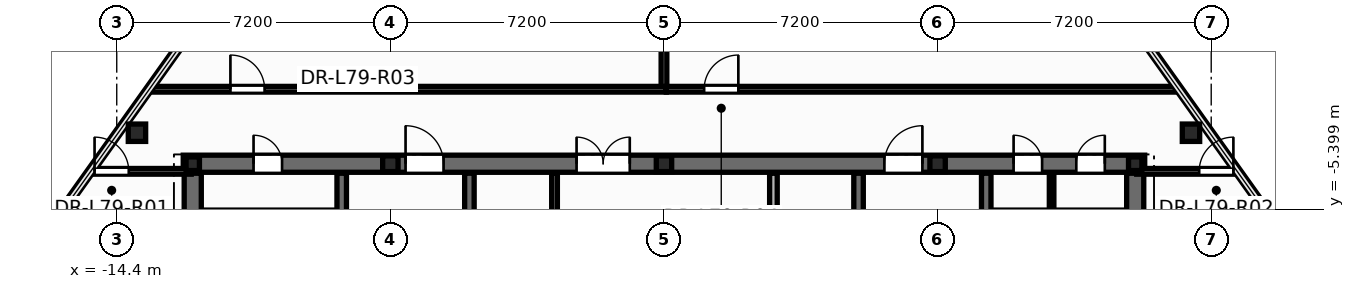
"""IFC4 building model, lengths in metres.
Left out: names, types, materials, properties, quantities, classifications, styles, units other than length and angle.
Written with IfcOpenShell. Run it as: python <this file> out.ifc"""

import sys

from ifc_helpers import new_model, si_unit, direction, frame, frame_2d, origin, origin_2d, place, context, subcontext, project, spatial, rectangle, hollow_circle, i_section, extrude, element, fill, save


model = new_model("IFC4")
c1 = context("Model", 3, precision=1e-05, world=origin(), true_north=direction((0.0, 1.0)))
c2 = subcontext(c1, "Body", "Model", "MODEL_VIEW")
j1 = project(units=[si_unit("LENGTHUNIT", "METRE"), si_unit("PLANEANGLEUNIT", "RADIAN")], contexts=[c1])
p1 = place(None, origin())
s1 = spatial("IfcSite", under=j1, at=p1, CompositionType="ELEMENT")
p2 = place(p1, origin())
s2 = spatial("IfcBuilding", under=s1, at=p2, CompositionType="ELEMENT")
p3 = place(p2, frame((0.0, 0.0, 301.8)))
s3 = spatial("IfcBuildingStorey", under=s2, at=p3, CompositionType="ELEMENT", Elevation=301.8)
for number, where, z_axis, x_axis in (
    (1, (13.868, -3.385, 0.0), (0.0, 0.0, 1.0), (1.0, 0.0, 0.0)),
    (2, (-13.868, -3.385, 0.0), (0.0, 0.0, 1.0), (1.0, 0.0, 0.0)),
):
    element("IfcColumn", number, at=place(p3, frame(where, z_axis=z_axis, x_axis=x_axis)), inside=s3, PredefinedType="COLUMN", context=c2, shape_type="SweptSolid", body=[
        extrude(hollow_circle(Radius=0.229, WallThickness=0.016, at=origin_2d()), origin(), (0.0, 0.0, 1.0), 4.2),
    ])
for number, where, z_axis, x_axis in (
    (3, (12.4, -4.2, 0.0), (0.0, 0.0, 1.0), (1.0, 0.0, 0.0)),
    (4, (-12.4, -4.2, 0.0), (0.0, 0.0, 1.0), (1.0, 0.0, 0.0)),
):
    element("IfcColumn", number, at=place(p3, frame(where, z_axis=z_axis, x_axis=x_axis)), inside=s3, PredefinedType="COLUMN", context=c2, shape_type="SweptSolid", body=[
        extrude(i_section(OverallWidth=0.352, OverallDepth=0.359, WebThickness=0.018, FlangeThickness=0.026, at=origin_2d()), origin(), (0.0, 0.0, 1.0), 4.2),
    ])
for number, where, z_axis, x_axis in (
    (5, (-7.2, -4.2, 0.0), (0.0, 0.0, 1.0), (1.0, 0.0, 0.0)),
    (6, (0.0, -4.2, 0.0), (0.0, 0.0, 1.0), (1.0, 0.0, 0.0)),
    (7, (7.2, -4.2, 0.0), (0.0, 0.0, 1.0), (1.0, 0.0, 0.0)),
):
    element("IfcColumn", number, at=place(p3, frame(where, z_axis=z_axis, x_axis=x_axis)), inside=s3, PredefinedType="PILASTER", context=c2, shape_type="SweptSolid", body=[
        extrude(i_section(OverallWidth=0.405, OverallDepth=0.414, WebThickness=0.022, FlangeThickness=0.032, at=origin_2d()), origin(), (0.0, 0.0, 1.0), 4.2),
    ])
p4 = place(p3, frame((-2.88, -5.6, 0.0), z_axis=(0.0, 0.0, 1.0), x_axis=(0.0, 1.0, 0.0)))
e8 = element("IfcWall", 8, at=p4, inside=s3, PredefinedType="PARTITIONING", context=c2, shape_type="SweptSolid", body=[
    extrude(rectangle(XDim=1.15, YDim=0.15, at=frame_2d((0.575, 0.0))), origin(), (0.0, 0.0, 1.0), 3.88),
])
p5 = place(p3, frame((10.2, -5.52, 0.0), z_axis=(0.0, 0.0, 1.0), x_axis=(0.0, 1.0, 0.0)))
e9 = element("IfcWall", 9, at=p5, inside=s3, PredefinedType="PARTITIONING", context=c2, shape_type="SweptSolid", body=[
    extrude(rectangle(XDim=1.12, YDim=0.12, at=frame_2d((0.56, 0.0))), origin(), (0.0, 0.0, 1.0), 3.88),
])
p6 = place(p3, frame((-12.65, -4.2, 0.0), z_axis=(0.0, 0.0, 1.0), x_axis=(1.0, 0.0, 0.0)))
e10 = element("IfcWall", 10, at=p6, inside=s3, PredefinedType="SHEAR", context=c2, shape_type="SweptSolid", body=[
    extrude(rectangle(XDim=25.3, YDim=0.45, at=frame_2d((12.65, 0.0))), origin(), (0.0, 0.0, 1.0), 4.2),
])
p7 = place(p6, frame((1.85, 0.0, 0.0)))
e11 = element("IfcOpeningElement", 11, at=p7, cuts=e10, PredefinedType="OPENING", context=c2, shape_type="SweptSolid", body=[
    extrude(rectangle(XDim=0.756, YDim=2.054, at=frame_2d((0.375, 1.027))), frame((0.0, 0.235, 0.0), z_axis=(0.0, -1.0, 0.0), x_axis=(1.0, 0.0, 0.0)), (0.0, 0.0, 1.0), 0.47),
])
p8 = place(p6, frame((21.85, 0.0, 0.0)))
e12 = element("IfcOpeningElement", 12, at=p8, cuts=e10, PredefinedType="OPENING", context=c2, shape_type="SweptSolid", body=[
    extrude(rectangle(XDim=0.756, YDim=2.054, at=frame_2d((0.375, 1.027))), frame((0.0, 0.235, 0.0), z_axis=(0.0, -1.0, 0.0), x_axis=(1.0, 0.0, 0.0)), (0.0, 0.0, 1.0), 0.47),
])
p9 = place(p6, frame((23.5, 0.0, 0.0)))
e13 = element("IfcOpeningElement", 13, at=p9, cuts=e10, PredefinedType="OPENING", context=c2, shape_type="SweptSolid", body=[
    extrude(rectangle(XDim=0.756, YDim=2.054, at=frame_2d((0.375, 1.027))), frame((0.0, 0.235, 0.0), z_axis=(0.0, -1.0, 0.0), x_axis=(1.0, 0.0, 0.0)), (0.0, 0.0, 1.0), 0.47),
])
p10 = place(p6, frame((5.85, 0.0, 0.0)))
e14 = element("IfcOpeningElement", 14, at=p10, cuts=e10, PredefinedType="OPENING", context=c2, shape_type="SweptSolid", body=[
    extrude(rectangle(XDim=1.006, YDim=2.104, at=frame_2d((0.5, 1.052))), frame((0.0, 0.235, 0.0), z_axis=(0.0, -1.0, 0.0), x_axis=(1.0, 0.0, 0.0)), (0.0, 0.0, 1.0), 0.47),
])
p11 = place(p6, frame((10.35, 0.0, 0.0)))
e15 = element("IfcOpeningElement", 15, at=p11, cuts=e10, PredefinedType="OPENING", context=c2, shape_type="SweptSolid", body=[
    extrude(rectangle(XDim=1.406, YDim=2.154, at=frame_2d((0.7, 1.077))), frame((0.0, 0.235, 0.0), z_axis=(0.0, -1.0, 0.0), x_axis=(1.0, 0.0, 0.0)), (0.0, 0.0, 1.0), 0.47),
])
p12 = place(p6, frame((18.45, 0.0, 0.0)))
e16 = element("IfcOpeningElement", 16, at=p12, cuts=e10, PredefinedType="OPENING", context=c2, shape_type="SweptSolid", body=[
    extrude(rectangle(XDim=1.006, YDim=2.104, at=frame_2d((0.5, 1.052))), frame((0.0, 0.235, 0.0), z_axis=(0.0, -1.0, 0.0), x_axis=(1.0, 0.0, 0.0)), (0.0, 0.0, 1.0), 0.47),
])
p13 = place(p3, frame((-8.48, -13.85, 0.0), z_axis=(0.0, 0.0, 1.0), x_axis=(0.0, 1.0, 0.0)))
e17 = element("IfcWall", 17, at=p13, inside=s3, PredefinedType="SHEAR", context=c2, shape_type="SweptSolid", body=[
    extrude(rectangle(XDim=9.4, YDim=0.25, at=frame_2d((4.7, 0.0))), origin(), (0.0, 0.0, 1.0), 4.2),
])
p14 = place(p13, frame((6.95, 0.0, 0.0)))
e18 = element("IfcOpeningElement", 18, at=p14, cuts=e17, PredefinedType="OPENING", context=c2, shape_type="SweptSolid", body=[
    extrude(rectangle(XDim=1.006, YDim=2.104, at=frame_2d((0.5, 1.052))), frame((0.0, 0.135, 0.0), z_axis=(0.0, -1.0, 0.0), x_axis=(1.0, 0.0, 0.0)), (0.0, 0.0, 1.0), 0.27),
])
p15 = place(p3, frame((8.48, -13.85, 0.0), z_axis=(0.0, 0.0, 1.0), x_axis=(0.0, 1.0, 0.0)))
e19 = element("IfcWall", 19, at=p15, inside=s3, PredefinedType="SHEAR", context=c2, shape_type="SweptSolid", body=[
    extrude(rectangle(XDim=9.4, YDim=0.25, at=frame_2d((4.7, 0.0))), origin(), (0.0, 0.0, 1.0), 4.2),
])
p16 = place(p15, frame((6.95, 0.0, 0.0)))
e20 = element("IfcOpeningElement", 20, at=p16, cuts=e19, PredefinedType="OPENING", context=c2, shape_type="SweptSolid", body=[
    extrude(rectangle(XDim=1.006, YDim=2.104, at=frame_2d((0.5, 1.052))), frame((0.0, 0.135, 0.0), z_axis=(0.0, -1.0, 0.0), x_axis=(1.0, 0.0, 0.0)), (0.0, 0.0, 1.0), 0.27),
])
for number, where, z_axis, x_axis in (
    (21, (-5.12, -13.85, 0.0), (0.0, 0.0, 1.0), (0.0, 1.0, 0.0)),
    (22, (5.12, -13.85, 0.0), (0.0, 0.0, 1.0), (0.0, 1.0, 0.0)),
):
    element("IfcWall", number, at=place(p3, frame(where, z_axis=z_axis, x_axis=x_axis)), inside=s3, PredefinedType="SHEAR", context=c2, shape_type="SweptSolid", body=[
        extrude(rectangle(XDim=9.4, YDim=0.25, at=frame_2d((4.7, 0.0))), origin(), (0.0, 0.0, 1.0), 4.2),
    ])
for number, where, z_axis, x_axis in (
    (23, (-12.4, -13.85, 0.0), (0.0, 0.0, 1.0), (0.0, 1.0, 0.0)),
    (24, (12.4, -13.85, 0.0), (0.0, 0.0, 1.0), (0.0, 1.0, 0.0)),
):
    element("IfcWall", number, at=place(p3, frame(where, z_axis=z_axis, x_axis=x_axis)), inside=s3, PredefinedType="SHEAR", context=c2, shape_type="SweptSolid", body=[
        extrude(rectangle(XDim=9.4, YDim=0.45, at=frame_2d((4.7, 0.0))), origin(), (0.0, 0.0, 1.0), 4.2),
    ])
p17 = place(p3, frame((2.88, -9.45, 0.0), z_axis=(0.0, 0.0, 1.0), x_axis=(0.0, 1.0, 0.0)))
e25 = element("IfcWall", 25, at=p17, inside=s3, PredefinedType="SOLIDWALL", context=c2, shape_type="SweptSolid", body=[
    extrude(rectangle(XDim=5.0, YDim=0.2, at=frame_2d((2.5, 0.0))), origin(), (0.0, 0.0, 1.0), 3.88),
])
p18 = place(p17, frame((2.05, 0.0, 0.0)))
e26 = element("IfcOpeningElement", 26, at=p18, cuts=e25, PredefinedType="OPENING", context=c2, shape_type="SweptSolid", body=[
    extrude(rectangle(XDim=0.926, YDim=2.104, at=frame_2d((0.46, 1.052))), frame((0.0, 0.11, 0.0), z_axis=(0.0, -1.0, 0.0), x_axis=(1.0, 0.0, 0.0)), (0.0, 0.0, 1.0), 0.22),
])
p19 = place(p3, frame((0.0, -2.24, 0.0), z_axis=(0.0, 0.0, 1.0), x_axis=(0.0, 1.0, 0.0)))
e27 = element("IfcWall", 27, at=p19, inside=s3, PredefinedType="PARTITIONING", context=c2, shape_type="SweptSolid", body=[
    extrude(rectangle(XDim=16.695, YDim=0.15, at=frame_2d((8.347, 0.0))), origin(), (0.0, 0.0, 1.0), 2.855),
])
p20 = place(p3, frame((-13.543, -2.24, 0.0), z_axis=(0.0, 0.0, 1.0), x_axis=(1.0, 0.0, 0.0)))
e28 = element("IfcWall", 28, at=p20, inside=s3, PredefinedType="PARTITIONING", context=c2, shape_type="SweptSolid", body=[
    extrude(rectangle(XDim=13.603, YDim=0.15, at=frame_2d((6.801, 0.0))), origin(), (0.0, 0.0, 1.0), 2.855),
])
p21 = place(p20, frame((2.134, 0.0, 0.0)))
e29 = element("IfcOpeningElement", 29, at=p21, cuts=e28, PredefinedType="OPENING", context=c2, shape_type="SweptSolid", body=[
    extrude(rectangle(XDim=0.906, YDim=2.104, at=frame_2d((0.45, 1.052))), frame((0.0, 0.085, 0.0), z_axis=(0.0, -1.0, 0.0), x_axis=(1.0, 0.0, 0.0)), (0.0, 0.0, 1.0), 0.17),
])
p22 = place(p3, frame((0.062, -2.24, 0.0), z_axis=(0.0, 0.0, 1.0), x_axis=(1.0, 0.0, 0.0)))
e30 = element("IfcWall", 30, at=p22, inside=s3, PredefinedType="PARTITIONING", context=c2, shape_type="SweptSolid", body=[
    extrude(rectangle(XDim=13.481, YDim=0.15, at=frame_2d((6.74, 0.0))), origin(), (0.0, 0.0, 1.0), 2.855),
])
p23 = place(p22, frame((0.995, 0.0, 0.0)))
e31 = element("IfcOpeningElement", 31, at=p23, cuts=e30, PredefinedType="OPENING", context=c2, shape_type="SweptSolid", body=[
    extrude(rectangle(XDim=0.906, YDim=2.104, at=frame_2d((0.45, 1.052))), frame((0.0, 0.085, 0.0), z_axis=(0.0, -1.0, 0.0), x_axis=(1.0, 0.0, 0.0)), (0.0, 0.0, 1.0), 0.17),
])
p24 = place(p3, frame((-15.083, -4.4, 0.0), z_axis=(0.0, 0.0, 1.0), x_axis=(1.0, 0.0, 0.0)))
e32 = element("IfcWall", 32, at=p24, inside=s3, PredefinedType="PARTITIONING", context=c2, shape_type="SweptSolid", body=[
    extrude(rectangle(XDim=2.644, YDim=0.15, at=frame_2d((1.322, 0.0))), origin(), (0.0, 0.0, 1.0), 2.855),
])
p25 = place(p24, frame((0.1, 0.0, 0.0)))
e33 = element("IfcOpeningElement", 33, at=p25, cuts=e32, PredefinedType="OPENING", context=c2, shape_type="SweptSolid", body=[
    extrude(rectangle(XDim=0.906, YDim=2.104, at=frame_2d((0.45, 1.052))), frame((0.0, 0.085, 0.0), z_axis=(0.0, -1.0, 0.0), x_axis=(1.0, 0.0, 0.0)), (0.0, 0.0, 1.0), 0.17),
])
p26 = place(p3, frame((12.44, -4.4, 0.0), z_axis=(0.0, 0.0, 1.0), x_axis=(1.0, 0.0, 0.0)))
e34 = element("IfcWall", 34, at=p26, inside=s3, PredefinedType="PARTITIONING", context=c2, shape_type="SweptSolid", body=[
    extrude(rectangle(XDim=2.644, YDim=0.15, at=frame_2d((1.322, 0.0))), origin(), (0.0, 0.0, 1.0), 2.855),
])
p27 = place(p26, frame((1.644, 0.0, 0.0)))
e35 = element("IfcOpeningElement", 35, at=p27, cuts=e34, PredefinedType="OPENING", context=c2, shape_type="SweptSolid", body=[
    extrude(rectangle(XDim=0.906, YDim=2.104, at=frame_2d((0.45, 1.052))), frame((0.0, 0.085, 0.0), z_axis=(0.0, -1.0, 0.0), x_axis=(1.0, 0.0, 0.0)), (0.0, 0.0, 1.0), 0.17),
])
p28 = place(p7, origin())
e36 = element("IfcDoor", 36, at=p28, inside=s3, OperationType="SINGLE_SWING_LEFT", PredefinedType="DOOR", context=c2, shape_type="SweptSolid", body=[
    extrude(rectangle(XDim=0.75, YDim=2.05, at=frame_2d((0.375, 1.025))), frame((0.0, 0.025, 0.0), z_axis=(0.0, -1.0, 0.0), x_axis=(1.0, 0.0, 0.0)), (0.0, 0.0, 1.0), 0.05),
])
fill(e11, e36)
p29 = place(p8, origin())
e37 = element("IfcDoor", 37, at=p29, inside=s3, OperationType="SINGLE_SWING_LEFT", PredefinedType="DOOR", context=c2, shape_type="SweptSolid", body=[
    extrude(rectangle(XDim=0.75, YDim=2.05, at=frame_2d((0.375, 1.025))), frame((0.0, 0.025, 0.0), z_axis=(0.0, -1.0, 0.0), x_axis=(1.0, 0.0, 0.0)), (0.0, 0.0, 1.0), 0.05),
])
fill(e12, e37)
p30 = place(p9, origin())
e38 = element("IfcDoor", 38, at=p30, inside=s3, OperationType="SINGLE_SWING_RIGHT", PredefinedType="DOOR", context=c2, shape_type="SweptSolid", body=[
    extrude(rectangle(XDim=0.75, YDim=2.05, at=frame_2d((0.375, 1.025))), frame((0.0, 0.025, 0.0), z_axis=(0.0, -1.0, 0.0), x_axis=(1.0, 0.0, 0.0)), (0.0, 0.0, 1.0), 0.05),
])
fill(e13, e38)
p31 = place(p10, origin())
e39 = element("IfcDoor", 39, at=p31, inside=s3, OperationType="SINGLE_SWING_LEFT", PredefinedType="DOOR", context=c2, shape_type="SweptSolid", body=[
    extrude(rectangle(XDim=1.0, YDim=2.1, at=frame_2d((0.5, 1.05))), frame((0.0, 0.025, 0.0), z_axis=(0.0, -1.0, 0.0), x_axis=(1.0, 0.0, 0.0)), (0.0, 0.0, 1.0), 0.05),
])
fill(e14, e39)
p32 = place(p11, origin())
e40 = element("IfcDoor", 40, at=p32, inside=s3, OperationType="DOUBLE_DOOR_SINGLE_SWING", PredefinedType="DOOR", context=c2, shape_type="SweptSolid", body=[
    extrude(rectangle(XDim=1.4, YDim=2.15, at=frame_2d((0.7, 1.075))), frame((0.0, 0.025, 0.0), z_axis=(0.0, -1.0, 0.0), x_axis=(1.0, 0.0, 0.0)), (0.0, 0.0, 1.0), 0.05),
])
fill(e15, e40)
p33 = place(p12, origin())
e41 = element("IfcDoor", 41, at=p33, inside=s3, OperationType="SINGLE_SWING_RIGHT", PredefinedType="DOOR", context=c2, shape_type="SweptSolid", body=[
    extrude(rectangle(XDim=1.0, YDim=2.1, at=frame_2d((0.5, 1.05))), frame((0.0, 0.025, 0.0), z_axis=(0.0, -1.0, 0.0), x_axis=(1.0, 0.0, 0.0)), (0.0, 0.0, 1.0), 0.05),
])
fill(e16, e41)
p34 = place(p25, origin())
e42 = element("IfcDoor", 42, at=p34, inside=s3, OperationType="SINGLE_SWING_LEFT", PredefinedType="DOOR", context=c2, shape_type="SweptSolid", body=[
    extrude(rectangle(XDim=0.9, YDim=2.1, at=frame_2d((0.45, 1.05))), frame((0.0, 0.025, 0.0), z_axis=(0.0, -1.0, 0.0), x_axis=(1.0, 0.0, 0.0)), (0.0, 0.0, 1.0), 0.05),
])
fill(e33, e42)
p35 = place(p27, origin())
e43 = element("IfcDoor", 43, at=p35, inside=s3, OperationType="SINGLE_SWING_RIGHT", PredefinedType="DOOR", context=c2, shape_type="SweptSolid", body=[
    extrude(rectangle(XDim=0.9, YDim=2.1, at=frame_2d((0.45, 1.05))), frame((0.0, 0.025, 0.0), z_axis=(0.0, -1.0, 0.0), x_axis=(1.0, 0.0, 0.0)), (0.0, 0.0, 1.0), 0.05),
])
fill(e35, e43)
p36 = place(p21, origin())
e44 = element("IfcDoor", 44, at=p36, inside=s3, OperationType="SINGLE_SWING_LEFT", PredefinedType="DOOR", context=c2, shape_type="SweptSolid", body=[
    extrude(rectangle(XDim=0.9, YDim=2.1, at=frame_2d((0.45, 1.05))), frame((0.0, 0.025, 0.0), z_axis=(0.0, -1.0, 0.0), x_axis=(1.0, 0.0, 0.0)), (0.0, 0.0, 1.0), 0.05),
])
fill(e29, e44)
p37 = place(p23, origin())
e45 = element("IfcDoor", 45, at=p37, inside=s3, OperationType="SINGLE_SWING_RIGHT", PredefinedType="DOOR", context=c2, shape_type="SweptSolid", body=[
    extrude(rectangle(XDim=0.9, YDim=2.1, at=frame_2d((0.45, 1.05))), frame((0.0, 0.025, 0.0), z_axis=(0.0, -1.0, 0.0), x_axis=(1.0, 0.0, 0.0)), (0.0, 0.0, 1.0), 0.05),
])
fill(e31, e45)
save(model, sys.argv[1])
